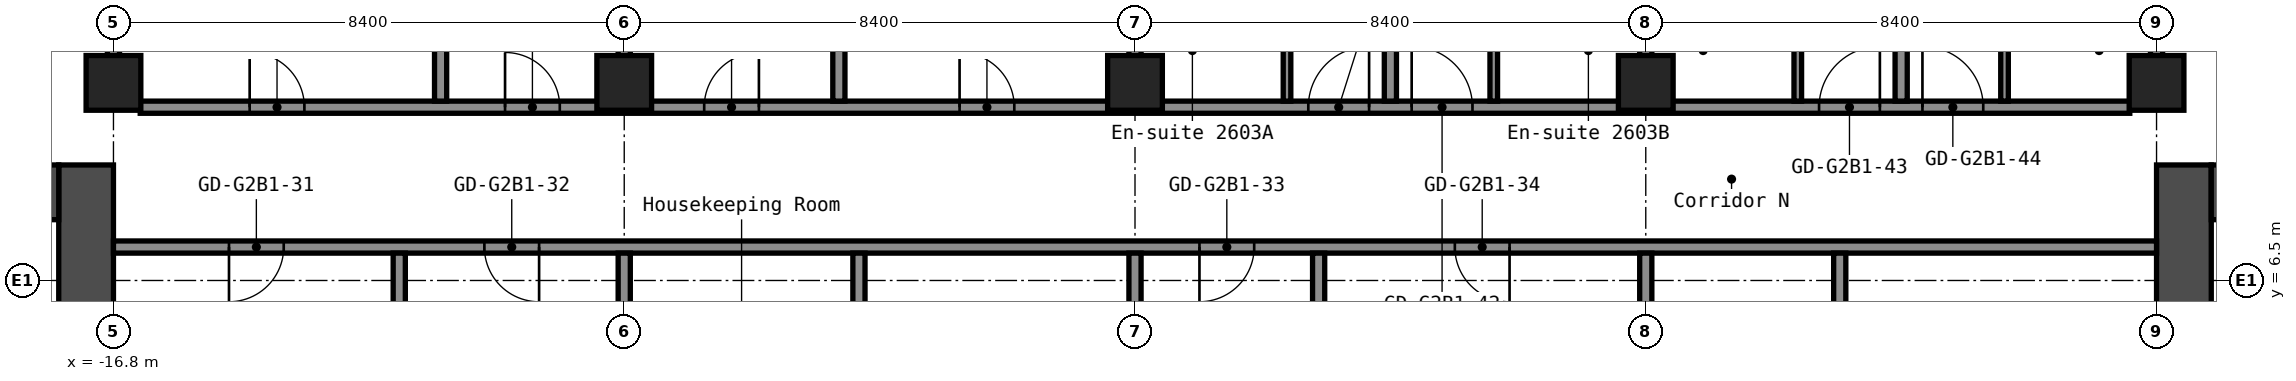
"""IFC4 building model, lengths in metres.
Left out: names, types, materials, properties, quantities, classifications, styles, units other than length and angle.
Written with IfcOpenShell. Run it as: python <this file> out.ifc"""

import sys

from ifc_helpers import new_model, si_unit, direction, frame, frame_2d, origin, origin_2d, place, context, subcontext, project, spatial, rectangle, hollow_rectangle, extrude, element, fill, save


model = new_model("IFC4")
c1 = context("Model", 3, precision=1e-05, world=origin(), true_north=direction((0.0, 1.0)))
c2 = subcontext(c1, "Body", "Model", "MODEL_VIEW")
j1 = project(units=[si_unit("LENGTHUNIT", "METRE"), si_unit("PLANEANGLEUNIT", "RADIAN")], contexts=[c1])
p1 = place(None, origin())
s1 = spatial("IfcSite", under=j1, at=p1, CompositionType="ELEMENT")
p2 = place(p1, origin())
s2 = spatial("IfcBuilding", under=s1, at=p2, CompositionType="ELEMENT")
p3 = place(p2, frame((0.0, 0.0, 94.6)))
s3 = spatial("IfcBuildingStorey", under=s2, at=p3, CompositionType="ELEMENT", Elevation=94.6)
for number, where, z_axis, x_axis in (
    (1, (-16.8, 9.75, 0.0), (0.0, 0.0, 1.0), (1.0, 0.0, 0.0)),
    (2, (-8.4, 9.75, 0.0), (0.0, 0.0, 1.0), (1.0, 0.0, 0.0)),
    (3, (0.0, 9.75, 0.0), (0.0, 0.0, 1.0), (1.0, 0.0, 0.0)),
    (4, (8.4, 9.75, 0.0), (0.0, 0.0, 1.0), (1.0, 0.0, 0.0)),
    (5, (16.8, 9.75, 0.0), (0.0, 0.0, 1.0), (1.0, 0.0, 0.0)),
):
    element("IfcColumn", number, at=place(p3, frame(where, z_axis=z_axis, x_axis=x_axis)), inside=s3, PredefinedType="COLUMN", context=c2, shape_type="SweptSolid", body=[
        extrude(hollow_rectangle(XDim=0.9, YDim=0.9, WallThickness=0.036, at=origin_2d()), origin(), (0.0, 0.0, 1.0), 2.8),
    ])
p4 = place(p3, frame((-17.25, -8.4, 0.0), z_axis=(0.0, 0.0, 1.0), x_axis=(0.0, 1.0, 0.0)))
e6 = element("IfcWall", 6, at=p4, inside=s3, PredefinedType="SHEAR", context=c2, shape_type="SweptSolid", body=[
    extrude(rectangle(XDim=16.8, YDim=0.9, at=frame_2d((8.4, 0.0))), origin(), (0.0, 0.0, 1.0), 2.8),
])
p5 = place(p4, frame((7.6, 0.0, 0.0)))
e7 = element("IfcOpeningElement", 7, at=p5, cuts=e6, PredefinedType="OPENING", context=c2, shape_type="SweptSolid", body=[
    extrude(rectangle(XDim=1.2, YDim=2.1, at=frame_2d((0.6, 1.05))), frame((0.0, 0.46, 0.0), z_axis=(0.0, -1.0, 0.0), x_axis=(1.0, 0.0, 0.0)), (0.0, 0.0, 1.0), 0.92),
])
p6 = place(p3, frame((-32.7, 7.95, 0.0), z_axis=(0.0, 0.0, 1.0), x_axis=(1.0, 0.0, 0.0)))
e8 = element("IfcWall", 8, at=p6, inside=s3, PredefinedType="SHEAR", context=c2, shape_type="SweptSolid", body=[
    extrude(rectangle(XDim=15.0, YDim=0.9, at=frame_2d((7.5, 0.0))), origin(), (0.0, 0.0, 1.0), 2.8),
])
p7 = place(p6, frame((3.4, 0.0, 0.0)))
e9 = element("IfcOpeningElement", 9, at=p7, cuts=e8, PredefinedType="OPENING", context=c2, shape_type="SweptSolid", body=[
    extrude(rectangle(XDim=1.2, YDim=2.1, at=frame_2d((0.6, 1.05))), frame((0.0, 0.46, 0.0), z_axis=(0.0, -1.0, 0.0), x_axis=(1.0, 0.0, 0.0)), (0.0, 0.0, 1.0), 0.92),
])
p8 = place(p6, frame((0.75, 0.0, 0.0)))
e10 = element("IfcOpeningElement", 10, at=p8, cuts=e8, PredefinedType="OPENING", context=c2, shape_type="SweptSolid", body=[
    extrude(rectangle(XDim=0.9, YDim=2.1, at=frame_2d((0.45, 1.05))), frame((0.0, 0.46, 0.0), z_axis=(0.0, -1.0, 0.0), x_axis=(1.0, 0.0, 0.0)), (0.0, 0.0, 1.0), 0.92),
])
p9 = place(p3, frame((17.25, -8.4, 0.0), z_axis=(0.0, 0.0, 1.0), x_axis=(0.0, 1.0, 0.0)))
e11 = element("IfcWall", 11, at=p9, inside=s3, PredefinedType="SHEAR", context=c2, shape_type="SweptSolid", body=[
    extrude(rectangle(XDim=16.8, YDim=0.9, at=frame_2d((8.4, 0.0))), origin(), (0.0, 0.0, 1.0), 2.8),
])
p10 = place(p9, frame((7.6, 0.0, 0.0)))
e12 = element("IfcOpeningElement", 12, at=p10, cuts=e11, PredefinedType="OPENING", context=c2, shape_type="SweptSolid", body=[
    extrude(rectangle(XDim=1.2, YDim=2.1, at=frame_2d((0.6, 1.05))), frame((0.0, 0.46, 0.0), z_axis=(0.0, -1.0, 0.0), x_axis=(1.0, 0.0, 0.0)), (0.0, 0.0, 1.0), 0.92),
])
p11 = place(p3, frame((17.7, 7.95, 0.0), z_axis=(0.0, 0.0, 1.0), x_axis=(1.0, 0.0, 0.0)))
e13 = element("IfcWall", 13, at=p11, inside=s3, PredefinedType="SHEAR", context=c2, shape_type="SweptSolid", body=[
    extrude(rectangle(XDim=15.0, YDim=0.9, at=frame_2d((7.5, 0.0))), origin(), (0.0, 0.0, 1.0), 2.8),
])
p12 = place(p11, frame((10.4, 0.0, 0.0)))
e14 = element("IfcOpeningElement", 14, at=p12, cuts=e13, PredefinedType="OPENING", context=c2, shape_type="SweptSolid", body=[
    extrude(rectangle(XDim=1.2, YDim=2.1, at=frame_2d((0.6, 1.05))), frame((0.0, 0.46, 0.0), z_axis=(0.0, -1.0, 0.0), x_axis=(1.0, 0.0, 0.0)), (0.0, 0.0, 1.0), 0.92),
])
p13 = place(p11, frame((13.35, 0.0, 0.0)))
e15 = element("IfcOpeningElement", 15, at=p13, cuts=e13, PredefinedType="OPENING", context=c2, shape_type="SweptSolid", body=[
    extrude(rectangle(XDim=0.9, YDim=2.1, at=frame_2d((0.45, 1.05))), frame((0.0, 0.46, 0.0), z_axis=(0.0, -1.0, 0.0), x_axis=(1.0, 0.0, 0.0)), (0.0, 0.0, 1.0), 0.92),
])
p14 = place(p3, frame((-16.8, 7.05, 0.0), z_axis=(0.0, 0.0, 1.0), x_axis=(1.0, 0.0, 0.0)))
e16 = element("IfcWall", 16, at=p14, inside=s3, PredefinedType="PARTITIONING", context=c2, shape_type="SweptSolid", body=[
    extrude(rectangle(XDim=33.6, YDim=0.2, at=frame_2d((16.8, 0.0))), origin(), (0.0, 0.0, 1.0), 2.8),
])
p15 = place(p14, frame((1.9, 0.0, 0.0)))
e17 = element("IfcOpeningElement", 17, at=p15, cuts=e16, PredefinedType="OPENING", context=c2, shape_type="SweptSolid", body=[
    extrude(rectangle(XDim=0.9, YDim=2.1, at=frame_2d((0.45, 1.05))), frame((0.0, 0.11, 0.0), z_axis=(0.0, -1.0, 0.0), x_axis=(1.0, 0.0, 0.0)), (0.0, 0.0, 1.0), 0.22),
])
p16 = place(p14, frame((6.1, 0.0, 0.0)))
e18 = element("IfcOpeningElement", 18, at=p16, cuts=e16, PredefinedType="OPENING", context=c2, shape_type="SweptSolid", body=[
    extrude(rectangle(XDim=0.9, YDim=2.1, at=frame_2d((0.45, 1.05))), frame((0.0, 0.11, 0.0), z_axis=(0.0, -1.0, 0.0), x_axis=(1.0, 0.0, 0.0)), (0.0, 0.0, 1.0), 0.22),
])
p17 = place(p14, frame((17.86, 0.0, 0.0)))
e19 = element("IfcOpeningElement", 19, at=p17, cuts=e16, PredefinedType="OPENING", context=c2, shape_type="SweptSolid", body=[
    extrude(rectangle(XDim=0.9, YDim=2.1, at=frame_2d((0.45, 1.05))), frame((0.0, 0.11, 0.0), z_axis=(0.0, -1.0, 0.0), x_axis=(1.0, 0.0, 0.0)), (0.0, 0.0, 1.0), 0.22),
])
p18 = place(p14, frame((22.06, 0.0, 0.0)))
e20 = element("IfcOpeningElement", 20, at=p18, cuts=e16, PredefinedType="OPENING", context=c2, shape_type="SweptSolid", body=[
    extrude(rectangle(XDim=0.9, YDim=2.1, at=frame_2d((0.45, 1.05))), frame((0.0, 0.11, 0.0), z_axis=(0.0, -1.0, 0.0), x_axis=(1.0, 0.0, 0.0)), (0.0, 0.0, 1.0), 0.22),
])
p19 = place(p3, frame((-16.36, 9.35, 0.0), z_axis=(0.0, 0.0, 1.0), x_axis=(1.0, 0.0, 0.0)))
e21 = element("IfcWall", 21, at=p19, inside=s3, PredefinedType="PARTITIONING", context=c2, shape_type="SweptSolid", body=[
    extrude(rectangle(XDim=32.72, YDim=0.2, at=frame_2d((16.36, 0.0))), origin(), (0.0, 0.0, 1.0), 2.8),
])
p20 = place(p19, frame((1.8, 0.0, 0.0)))
e22 = element("IfcOpeningElement", 22, at=p20, cuts=e21, PredefinedType="OPENING", context=c2, shape_type="SweptSolid", body=[
    extrude(rectangle(XDim=0.9, YDim=2.1, at=frame_2d((0.45, 1.05))), frame((0.0, 0.11, 0.0), z_axis=(0.0, -1.0, 0.0), x_axis=(1.0, 0.0, 0.0)), (0.0, 0.0, 1.0), 0.22),
])
p21 = place(p19, frame((6.0, 0.0, 0.0)))
e23 = element("IfcOpeningElement", 23, at=p21, cuts=e21, PredefinedType="OPENING", context=c2, shape_type="SweptSolid", body=[
    extrude(rectangle(XDim=0.9, YDim=2.1, at=frame_2d((0.45, 1.05))), frame((0.0, 0.11, 0.0), z_axis=(0.0, -1.0, 0.0), x_axis=(1.0, 0.0, 0.0)), (0.0, 0.0, 1.0), 0.22),
])
p22 = place(p19, frame((9.275, 0.0, 0.0)))
e24 = element("IfcOpeningElement", 24, at=p22, cuts=e21, PredefinedType="OPENING", context=c2, shape_type="SweptSolid", body=[
    extrude(rectangle(XDim=0.9, YDim=2.1, at=frame_2d((0.45, 1.05))), frame((0.0, 0.11, 0.0), z_axis=(0.0, -1.0, 0.0), x_axis=(1.0, 0.0, 0.0)), (0.0, 0.0, 1.0), 0.22),
])
p23 = place(p19, frame((13.475, 0.0, 0.0)))
e25 = element("IfcOpeningElement", 25, at=p23, cuts=e21, PredefinedType="OPENING", context=c2, shape_type="SweptSolid", body=[
    extrude(rectangle(XDim=0.9, YDim=2.1, at=frame_2d((0.45, 1.05))), frame((0.0, 0.11, 0.0), z_axis=(0.0, -1.0, 0.0), x_axis=(1.0, 0.0, 0.0)), (0.0, 0.0, 1.0), 0.22),
])
p24 = place(p19, frame((19.21, 0.0, 0.0)))
e26 = element("IfcOpeningElement", 26, at=p24, cuts=e21, PredefinedType="OPENING", context=c2, shape_type="SweptSolid", body=[
    extrude(rectangle(XDim=1.0, YDim=2.1, at=frame_2d((0.5, 1.05))), frame((0.0, 0.11, 0.0), z_axis=(0.0, -1.0, 0.0), x_axis=(1.0, 0.0, 0.0)), (0.0, 0.0, 1.0), 0.22),
])
p25 = place(p19, frame((20.91, 0.0, 0.0)))
e27 = element("IfcOpeningElement", 27, at=p25, cuts=e21, PredefinedType="OPENING", context=c2, shape_type="SweptSolid", body=[
    extrude(rectangle(XDim=1.0, YDim=2.1, at=frame_2d((0.5, 1.05))), frame((0.0, 0.11, 0.0), z_axis=(0.0, -1.0, 0.0), x_axis=(1.0, 0.0, 0.0)), (0.0, 0.0, 1.0), 0.22),
])
p26 = place(p19, frame((27.61, 0.0, 0.0)))
e28 = element("IfcOpeningElement", 28, at=p26, cuts=e21, PredefinedType="OPENING", context=c2, shape_type="SweptSolid", body=[
    extrude(rectangle(XDim=1.0, YDim=2.1, at=frame_2d((0.5, 1.05))), frame((0.0, 0.11, 0.0), z_axis=(0.0, -1.0, 0.0), x_axis=(1.0, 0.0, 0.0)), (0.0, 0.0, 1.0), 0.22),
])
p27 = place(p19, frame((29.31, 0.0, 0.0)))
e29 = element("IfcOpeningElement", 29, at=p27, cuts=e21, PredefinedType="OPENING", context=c2, shape_type="SweptSolid", body=[
    extrude(rectangle(XDim=1.0, YDim=2.1, at=frame_2d((0.5, 1.05))), frame((0.0, 0.11, 0.0), z_axis=(0.0, -1.0, 0.0), x_axis=(1.0, 0.0, 0.0)), (0.0, 0.0, 1.0), 0.22),
])
p28 = place(p3, frame((-16.8, 10.19, 0.0), z_axis=(0.0, 0.0, 1.0), x_axis=(0.0, 1.0, 0.0)))
e30 = element("IfcWall", 30, at=p28, inside=s3, PredefinedType="PARTITIONING", context=c2, shape_type="SweptSolid", body=[
    extrude(rectangle(XDim=13.36, YDim=0.2, at=frame_2d((6.68, 0.0))), origin(), (0.0, 0.0, 1.0), 2.8),
])
p29 = place(p3, frame((-12.1, 1.05, 0.0), z_axis=(0.0, 0.0, 1.0), x_axis=(0.0, 1.0, 0.0)))
e31 = element("IfcWall", 31, at=p29, inside=s3, PredefinedType="PARTITIONING", context=c2, shape_type="SweptSolid", body=[
    extrude(rectangle(XDim=5.9, YDim=0.2, at=frame_2d((2.95, 0.0))), origin(), (0.0, 0.0, 1.0), 2.8),
])
p30 = place(p3, frame((-11.42, 9.45, 0.0), z_axis=(0.0, 0.0, 1.0), x_axis=(0.0, 1.0, 0.0)))
e32 = element("IfcWall", 32, at=p30, inside=s3, PredefinedType="PARTITIONING", context=c2, shape_type="SweptSolid", body=[
    extrude(rectangle(XDim=14.1, YDim=0.2, at=frame_2d((7.05, 0.0))), origin(), (0.0, 0.0, 1.0), 2.8),
])
p31 = place(p3, frame((-8.4, 1.05, 0.0), z_axis=(0.0, 0.0, 1.0), x_axis=(0.0, 1.0, 0.0)))
e33 = element("IfcWall", 33, at=p31, inside=s3, PredefinedType="PARTITIONING", context=c2, shape_type="SweptSolid", body=[
    extrude(rectangle(XDim=5.9, YDim=0.2, at=frame_2d((2.95, 0.0))), origin(), (0.0, 0.0, 1.0), 2.8),
])
p32 = place(p3, frame((-8.4, 10.19, 0.0), z_axis=(0.0, 0.0, 1.0), x_axis=(0.0, 1.0, 0.0)))
e34 = element("IfcWall", 34, at=p32, inside=s3, PredefinedType="PARTITIONING", context=c2, shape_type="SweptSolid", body=[
    extrude(rectangle(XDim=13.36, YDim=0.2, at=frame_2d((6.68, 0.0))), origin(), (0.0, 0.0, 1.0), 2.8),
])
p33 = place(p3, frame((-4.87, 9.45, 0.0), z_axis=(0.0, 0.0, 1.0), x_axis=(0.0, 1.0, 0.0)))
e35 = element("IfcWall", 35, at=p33, inside=s3, PredefinedType="PARTITIONING", context=c2, shape_type="SweptSolid", body=[
    extrude(rectangle(XDim=14.1, YDim=0.2, at=frame_2d((7.05, 0.0))), origin(), (0.0, 0.0, 1.0), 2.8),
])
for number, where, z_axis, x_axis in (
    (36, (-4.54, 1.05, 0.0), (0.0, 0.0, 1.0), (0.0, 1.0, 0.0)),
    (37, (0.0, 1.05, 0.0), (0.0, 0.0, 1.0), (0.0, 1.0, 0.0)),
):
    element("IfcWall", number, at=place(p3, frame(where, z_axis=z_axis, x_axis=x_axis)), inside=s3, PredefinedType="PARTITIONING", context=c2, shape_type="SweptSolid", body=[
        extrude(rectangle(XDim=5.9, YDim=0.2, at=frame_2d((2.95, 0.0))), origin(), (0.0, 0.0, 1.0), 2.8),
    ])
p34 = place(p3, frame((0.0, 10.19, 0.0), z_axis=(0.0, 0.0, 1.0), x_axis=(0.0, 1.0, 0.0)))
e38 = element("IfcWall", 38, at=p34, inside=s3, PredefinedType="PARTITIONING", context=c2, shape_type="SweptSolid", body=[
    extrude(rectangle(XDim=13.36, YDim=0.2, at=frame_2d((6.68, 0.0))), origin(), (0.0, 0.0, 1.0), 2.8),
])
p35 = place(p3, frame((2.5, 9.45, 0.0), z_axis=(0.0, 0.0, 1.0), x_axis=(0.0, 1.0, 0.0)))
e39 = element("IfcWall", 39, at=p35, inside=s3, PredefinedType="PARTITIONING", context=c2, shape_type="SweptSolid", body=[
    extrude(rectangle(XDim=2.9, YDim=0.125, at=frame_2d((1.45, 0.0))), origin(), (0.0, 0.0, 1.0), 2.8),
])
p36 = place(p35, frame((1.5, 0.0, 0.0)))
e40 = element("IfcOpeningElement", 40, at=p36, cuts=e39, PredefinedType="OPENING", context=c2, shape_type="SweptSolid", body=[
    extrude(rectangle(XDim=0.8, YDim=2.1, at=frame_2d((0.4, 1.05))), frame((0.0, 0.073, 0.0), z_axis=(0.0, -1.0, 0.0), x_axis=(1.0, 0.0, 0.0)), (0.0, 0.0, 1.0), 0.145),
])
p37 = place(p3, frame((3.02, 1.05, 0.0), z_axis=(0.0, 0.0, 1.0), x_axis=(0.0, 1.0, 0.0)))
e41 = element("IfcWall", 41, at=p37, inside=s3, PredefinedType="PARTITIONING", context=c2, shape_type="SweptSolid", body=[
    extrude(rectangle(XDim=5.9, YDim=0.2, at=frame_2d((2.95, 0.0))), origin(), (0.0, 0.0, 1.0), 2.8),
])
p38 = place(p3, frame((4.2, 9.45, 0.0), z_axis=(0.0, 0.0, 1.0), x_axis=(0.0, 1.0, 0.0)))
e42 = element("IfcWall", 42, at=p38, inside=s3, PredefinedType="PARTITIONING", context=c2, shape_type="SweptSolid", body=[
    extrude(rectangle(XDim=14.1, YDim=0.2, at=frame_2d((7.05, 0.0))), origin(), (0.0, 0.0, 1.0), 2.8),
])
p39 = place(p3, frame((5.9, 9.45, 0.0), z_axis=(0.0, 0.0, 1.0), x_axis=(0.0, 1.0, 0.0)))
e43 = element("IfcWall", 43, at=p39, inside=s3, PredefinedType="PARTITIONING", context=c2, shape_type="SweptSolid", body=[
    extrude(rectangle(XDim=2.9, YDim=0.125, at=frame_2d((1.45, 0.0))), origin(), (0.0, 0.0, 1.0), 2.8),
])
p40 = place(p39, frame((1.5, 0.0, 0.0)))
e44 = element("IfcOpeningElement", 44, at=p40, cuts=e43, PredefinedType="OPENING", context=c2, shape_type="SweptSolid", body=[
    extrude(rectangle(XDim=0.8, YDim=2.1, at=frame_2d((0.4, 1.05))), frame((0.0, 0.073, 0.0), z_axis=(0.0, -1.0, 0.0), x_axis=(1.0, 0.0, 0.0)), (0.0, 0.0, 1.0), 0.145),
])
p41 = place(p3, frame((8.4, 1.05, 0.0), z_axis=(0.0, 0.0, 1.0), x_axis=(0.0, 1.0, 0.0)))
e45 = element("IfcWall", 45, at=p41, inside=s3, PredefinedType="PARTITIONING", context=c2, shape_type="SweptSolid", body=[
    extrude(rectangle(XDim=5.9, YDim=0.2, at=frame_2d((2.95, 0.0))), origin(), (0.0, 0.0, 1.0), 2.8),
])
p42 = place(p3, frame((8.4, 10.19, 0.0), z_axis=(0.0, 0.0, 1.0), x_axis=(0.0, 1.0, 0.0)))
e46 = element("IfcWall", 46, at=p42, inside=s3, PredefinedType="PARTITIONING", context=c2, shape_type="SweptSolid", body=[
    extrude(rectangle(XDim=13.36, YDim=0.2, at=frame_2d((6.68, 0.0))), origin(), (0.0, 0.0, 1.0), 2.8),
])
p43 = place(p3, frame((10.9, 9.45, 0.0), z_axis=(0.0, 0.0, 1.0), x_axis=(0.0, 1.0, 0.0)))
e47 = element("IfcWall", 47, at=p43, inside=s3, PredefinedType="PARTITIONING", context=c2, shape_type="SweptSolid", body=[
    extrude(rectangle(XDim=2.9, YDim=0.125, at=frame_2d((1.45, 0.0))), origin(), (0.0, 0.0, 1.0), 2.8),
])
p44 = place(p43, frame((1.5, 0.0, 0.0)))
e48 = element("IfcOpeningElement", 48, at=p44, cuts=e47, PredefinedType="OPENING", context=c2, shape_type="SweptSolid", body=[
    extrude(rectangle(XDim=0.8, YDim=2.1, at=frame_2d((0.4, 1.05))), frame((0.0, 0.073, 0.0), z_axis=(0.0, -1.0, 0.0), x_axis=(1.0, 0.0, 0.0)), (0.0, 0.0, 1.0), 0.145),
])
p45 = place(p3, frame((11.59, 1.05, 0.0), z_axis=(0.0, 0.0, 1.0), x_axis=(0.0, 1.0, 0.0)))
e49 = element("IfcWall", 49, at=p45, inside=s3, PredefinedType="PARTITIONING", context=c2, shape_type="SweptSolid", body=[
    extrude(rectangle(XDim=5.9, YDim=0.2, at=frame_2d((2.95, 0.0))), origin(), (0.0, 0.0, 1.0), 2.8),
])
p46 = place(p3, frame((12.6, 9.45, 0.0), z_axis=(0.0, 0.0, 1.0), x_axis=(0.0, 1.0, 0.0)))
e50 = element("IfcWall", 50, at=p46, inside=s3, PredefinedType="PARTITIONING", context=c2, shape_type="SweptSolid", body=[
    extrude(rectangle(XDim=14.1, YDim=0.2, at=frame_2d((7.05, 0.0))), origin(), (0.0, 0.0, 1.0), 2.8),
])
p47 = place(p3, frame((14.3, 9.45, 0.0), z_axis=(0.0, 0.0, 1.0), x_axis=(0.0, 1.0, 0.0)))
e51 = element("IfcWall", 51, at=p47, inside=s3, PredefinedType="PARTITIONING", context=c2, shape_type="SweptSolid", body=[
    extrude(rectangle(XDim=2.9, YDim=0.125, at=frame_2d((1.45, 0.0))), origin(), (0.0, 0.0, 1.0), 2.8),
])
p48 = place(p47, frame((1.5, 0.0, 0.0)))
e52 = element("IfcOpeningElement", 52, at=p48, cuts=e51, PredefinedType="OPENING", context=c2, shape_type="SweptSolid", body=[
    extrude(rectangle(XDim=0.8, YDim=2.1, at=frame_2d((0.4, 1.05))), frame((0.0, 0.073, 0.0), z_axis=(0.0, -1.0, 0.0), x_axis=(1.0, 0.0, 0.0)), (0.0, 0.0, 1.0), 0.145),
])
p49 = place(p3, frame((16.8, 10.19, 0.0), z_axis=(0.0, 0.0, 1.0), x_axis=(0.0, 1.0, 0.0)))
e53 = element("IfcWall", 53, at=p49, inside=s3, PredefinedType="PARTITIONING", context=c2, shape_type="SweptSolid", body=[
    extrude(rectangle(XDim=13.36, YDim=0.2, at=frame_2d((6.68, 0.0))), origin(), (0.0, 0.0, 1.0), 2.8),
])
p50 = place(p15, origin())
e54 = element("IfcDoor", 54, at=p50, inside=s3, OperationType="SINGLE_SWING_LEFT", PredefinedType="DOOR", context=c2, shape_type="SweptSolid", body=[
    extrude(rectangle(XDim=0.9, YDim=2.1, at=frame_2d((0.45, 1.05))), frame((0.0, 0.025, 0.0), z_axis=(0.0, -1.0, 0.0), x_axis=(1.0, 0.0, 0.0)), (0.0, 0.0, 1.0), 0.05),
])
fill(e17, e54)
p51 = place(p16, origin())
e55 = element("IfcDoor", 55, at=p51, inside=s3, OperationType="SINGLE_SWING_RIGHT", PredefinedType="DOOR", context=c2, shape_type="SweptSolid", body=[
    extrude(rectangle(XDim=0.9, YDim=2.1, at=frame_2d((0.45, 1.05))), frame((0.0, 0.025, 0.0), z_axis=(0.0, -1.0, 0.0), x_axis=(1.0, 0.0, 0.0)), (0.0, 0.0, 1.0), 0.05),
])
fill(e18, e55)
p52 = place(p17, origin())
e56 = element("IfcDoor", 56, at=p52, inside=s3, OperationType="SINGLE_SWING_LEFT", PredefinedType="DOOR", context=c2, shape_type="SweptSolid", body=[
    extrude(rectangle(XDim=0.9, YDim=2.1, at=frame_2d((0.45, 1.05))), frame((0.0, 0.025, 0.0), z_axis=(0.0, -1.0, 0.0), x_axis=(1.0, 0.0, 0.0)), (0.0, 0.0, 1.0), 0.05),
])
fill(e19, e56)
p53 = place(p18, origin())
e57 = element("IfcDoor", 57, at=p53, inside=s3, OperationType="SINGLE_SWING_RIGHT", PredefinedType="DOOR", context=c2, shape_type="SweptSolid", body=[
    extrude(rectangle(XDim=0.9, YDim=2.1, at=frame_2d((0.45, 1.05))), frame((0.0, 0.025, 0.0), z_axis=(0.0, -1.0, 0.0), x_axis=(1.0, 0.0, 0.0)), (0.0, 0.0, 1.0), 0.05),
])
fill(e20, e57)
p54 = place(p20, origin())
e58 = element("IfcDoor", 58, at=p54, inside=s3, OperationType="SINGLE_SWING_RIGHT", PredefinedType="DOOR", context=c2, shape_type="SweptSolid", body=[
    extrude(rectangle(XDim=0.9, YDim=2.1, at=frame_2d((0.45, 1.05))), frame((0.0, 0.025, 0.0), z_axis=(0.0, -1.0, 0.0), x_axis=(1.0, 0.0, 0.0)), (0.0, 0.0, 1.0), 0.05),
])
fill(e22, e58)
p55 = place(p21, origin())
e59 = element("IfcDoor", 59, at=p55, inside=s3, OperationType="SINGLE_SWING_RIGHT", PredefinedType="DOOR", context=c2, shape_type="SweptSolid", body=[
    extrude(rectangle(XDim=0.9, YDim=2.1, at=frame_2d((0.45, 1.05))), frame((0.0, 0.025, 0.0), z_axis=(0.0, -1.0, 0.0), x_axis=(1.0, 0.0, 0.0)), (0.0, 0.0, 1.0), 0.05),
])
fill(e23, e59)
p56 = place(p22, origin())
e60 = element("IfcDoor", 60, at=p56, inside=s3, OperationType="SINGLE_SWING_LEFT", PredefinedType="DOOR", context=c2, shape_type="SweptSolid", body=[
    extrude(rectangle(XDim=0.9, YDim=2.1, at=frame_2d((0.45, 1.05))), frame((0.0, 0.025, 0.0), z_axis=(0.0, -1.0, 0.0), x_axis=(1.0, 0.0, 0.0)), (0.0, 0.0, 1.0), 0.05),
])
fill(e24, e60)
p57 = place(p23, origin())
e61 = element("IfcDoor", 61, at=p57, inside=s3, OperationType="SINGLE_SWING_RIGHT", PredefinedType="DOOR", context=c2, shape_type="SweptSolid", body=[
    extrude(rectangle(XDim=0.9, YDim=2.1, at=frame_2d((0.45, 1.05))), frame((0.0, 0.025, 0.0), z_axis=(0.0, -1.0, 0.0), x_axis=(1.0, 0.0, 0.0)), (0.0, 0.0, 1.0), 0.05),
])
fill(e25, e61)
p58 = place(p24, origin())
e62 = element("IfcDoor", 62, at=p58, inside=s3, OperationType="SINGLE_SWING_LEFT", PredefinedType="DOOR", context=c2, shape_type="SweptSolid", body=[
    extrude(rectangle(XDim=1.0, YDim=2.1, at=frame_2d((0.5, 1.05))), frame((0.0, 0.025, 0.0), z_axis=(0.0, -1.0, 0.0), x_axis=(1.0, 0.0, 0.0)), (0.0, 0.0, 1.0), 0.05),
])
fill(e26, e62)
p59 = place(p25, origin())
e63 = element("IfcDoor", 63, at=p59, inside=s3, OperationType="SINGLE_SWING_RIGHT", PredefinedType="DOOR", context=c2, shape_type="SweptSolid", body=[
    extrude(rectangle(XDim=1.0, YDim=2.1, at=frame_2d((0.5, 1.05))), frame((0.0, 0.025, 0.0), z_axis=(0.0, -1.0, 0.0), x_axis=(1.0, 0.0, 0.0)), (0.0, 0.0, 1.0), 0.05),
])
fill(e27, e63)
p60 = place(p26, origin())
e64 = element("IfcDoor", 64, at=p60, inside=s3, OperationType="SINGLE_SWING_LEFT", PredefinedType="DOOR", context=c2, shape_type="SweptSolid", body=[
    extrude(rectangle(XDim=1.0, YDim=2.1, at=frame_2d((0.5, 1.05))), frame((0.0, 0.025, 0.0), z_axis=(0.0, -1.0, 0.0), x_axis=(1.0, 0.0, 0.0)), (0.0, 0.0, 1.0), 0.05),
])
fill(e28, e64)
p61 = place(p27, origin())
e65 = element("IfcDoor", 65, at=p61, inside=s3, OperationType="SINGLE_SWING_RIGHT", PredefinedType="DOOR", context=c2, shape_type="SweptSolid", body=[
    extrude(rectangle(XDim=1.0, YDim=2.1, at=frame_2d((0.5, 1.05))), frame((0.0, 0.025, 0.0), z_axis=(0.0, -1.0, 0.0), x_axis=(1.0, 0.0, 0.0)), (0.0, 0.0, 1.0), 0.05),
])
fill(e29, e65)
save(model, sys.argv[1])
